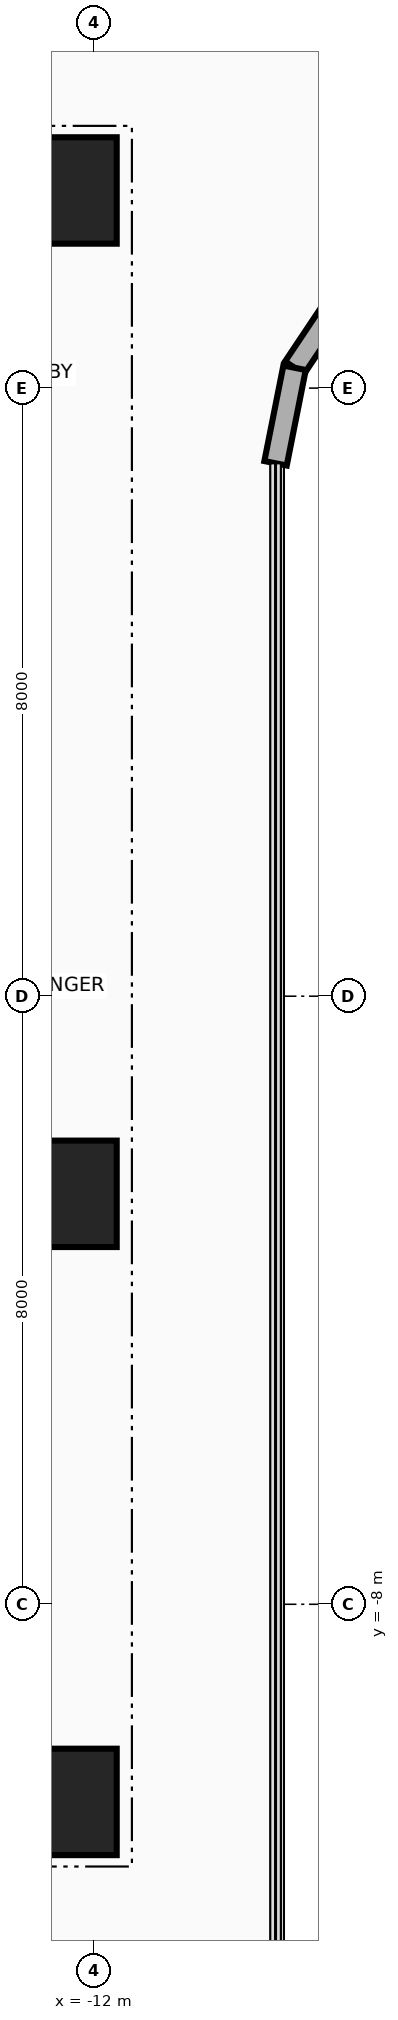
"""IFC4 building model, lengths in metres.
Left out: names, types, materials, properties, quantities, classifications, styles, units other than length and angle.
Written with IfcOpenShell. Run it as: python <this file> out.ifc"""

import sys

from ifc_helpers import new_model, si_unit, direction, frame, frame_2d, origin, origin_2d, place, context, subcontext, project, spatial, rectangle, extrude, source, transform, mapped, element, save


model = new_model("IFC4")
c1 = context("Model", 3, precision=1e-05, world=origin(), true_north=direction((0.0, 1.0)))
c2 = subcontext(c1, "Body", "Model", "MODEL_VIEW")
j1 = project(units=[si_unit("LENGTHUNIT", "METRE"), si_unit("PLANEANGLEUNIT", "RADIAN")], contexts=[c1])
p1 = place(None, origin())
s1 = spatial("IfcSite", under=j1, at=p1, CompositionType="ELEMENT")
p2 = place(p1, origin())
s2 = spatial("IfcBuilding", under=s1, at=p2, CompositionType="ELEMENT")
p3 = place(p2, frame((0.0, 0.0, 33.4)))
s3 = spatial("IfcBuildingStorey", under=s2, at=p3, CompositionType="ELEMENT", Elevation=33.4)
for number, where, z_axis, x_axis in (
    (1, (-22.65, 10.8, 0.0), (0.0, 0.0, 1.0), (1.0, 0.0, 0.0)),
    (2, (-22.65, -10.8, 0.0), (0.0, 0.0, 1.0), (1.0, 0.0, 0.0)),
):
    element("IfcWall", number, at=place(p3, frame(where, z_axis=z_axis, x_axis=x_axis)), inside=s3, PredefinedType="SHEAR", context=c2, shape_type="SweptSolid", body=[
        extrude(rectangle(XDim=10.25, YDim=0.7, at=frame_2d((5.125, 0.0))), origin(), (0.0, 0.0, 1.0), 3.46),
    ])
m1 = source(origin(), c2, "Body", "SweptSolid", [
    extrude(rectangle(XDim=1.4, YDim=1.4, at=origin_2d()), origin(), (0.0, 0.0, 1.0), 3.7),
])
for number, where, z_axis, x_axis in (
    (3, (-12.4, -10.6, 0.0), (0.0, 0.0, 1.0), (1.0, 0.0, 0.0)),
    (4, (-12.4, -2.6, 0.0), (0.0, 0.0, 1.0), (1.0, 0.0, 0.0)),
    (5, (-12.4, 10.6, 0.0), (0.0, 0.0, 1.0), (1.0, 0.0, 0.0)),
):
    element("IfcColumn", number, at=place(p3, frame(where, z_axis=z_axis, x_axis=x_axis)), inside=s3, PredefinedType="COLUMN", context=c2, shape_type="MappedRepresentation", body=[
        mapped(m1, transform((0.0, 0.0, 0.0), x_axis=(1.0, 0.0, 0.0), y_axis=(0.0, 1.0, 0.0), z_axis=(0.0, 0.0, 1.0), scale=1.0)),
    ])
p4 = place(p3, frame((-8.642, 9.342, 0.0), z_axis=(0.0, 0.0, 1.0), x_axis=(-0.555615398575, -0.831439431869, 0.0)))
e6 = element("IfcWall", 6, at=p4, inside=s3, PredefinedType="SOLIDWALL", context=c2, shape_type="SweptSolid", body=[
    extrude(rectangle(XDim=1.292, YDim=0.3, at=frame_2d((0.646, 0.0))), origin(), (0.0, 0.0, 1.0), 3.46),
])
p5 = place(p3, frame((-9.36, 8.268, 0.0), z_axis=(0.0, 0.0, 1.0), x_axis=(-0.195090163074, -0.980785312019, 0.0)))
e7 = element("IfcWall", 7, at=p5, inside=s3, PredefinedType="SOLIDWALL", context=c2, shape_type="SweptSolid", body=[
    extrude(rectangle(XDim=1.281, YDim=0.3, at=frame_2d((0.641, 0.0))), origin(), (0.0, 0.0, 1.0), 3.46),
])
save(model, sys.argv[1])
